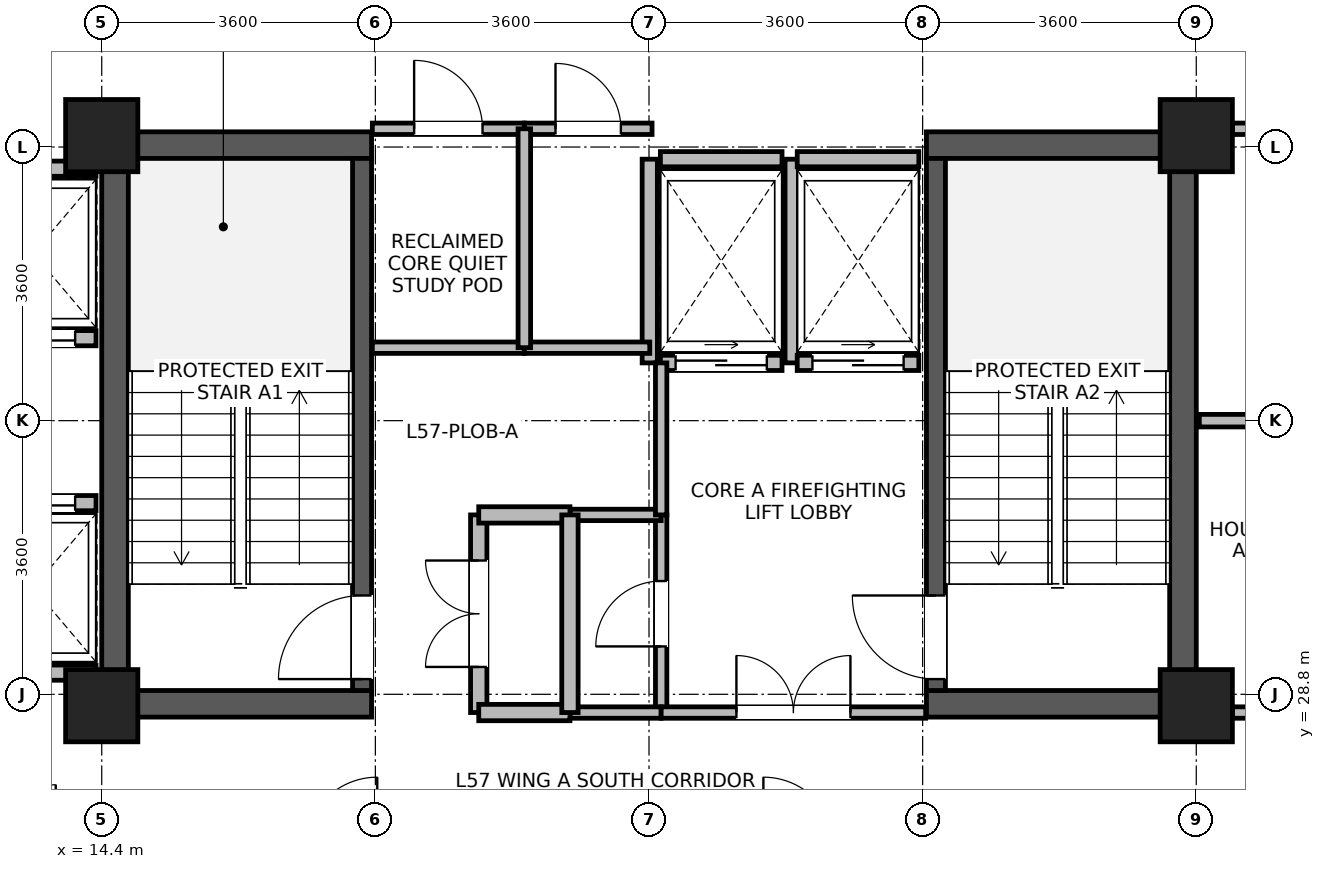
"""IFC4 building model, lengths in metres.
Left out: names, types, materials, properties, quantities, classifications, styles, units other than length and angle.
Written with IfcOpenShell. Run it as: python <this file> out.ifc"""

import sys

from ifc_helpers import new_model, si_unit, direction, frame, frame_2d, origin, origin_2d, place, context, subcontext, project, spatial, rectangle, extrude, source, transform, mapped, element, fill, save


model = new_model("IFC4")
c1 = context("Model", 3, precision=1e-05, world=origin(), true_north=direction((0.0, 1.0)))
c2 = subcontext(c1, "Body", "Model", "MODEL_VIEW")
j1 = project(units=[si_unit("LENGTHUNIT", "METRE"), si_unit("PLANEANGLEUNIT", "RADIAN")], contexts=[c1])
p1 = place(None, origin())
s1 = spatial("IfcSite", under=j1, at=p1, CompositionType="ELEMENT")
p2 = place(p1, origin())
s2 = spatial("IfcBuilding", under=s1, at=p2, CompositionType="ELEMENT")
p3 = place(p2, frame((0.0, 0.0, 224.0)))
s3 = spatial("IfcBuildingStorey", under=s2, at=p3, CompositionType="ELEMENT", Elevation=224.0)
for number, where, z_axis, x_axis in (
    (1, (14.575, 28.5, 0.0), (0.0, 0.0, 1.0), (0.0, 1.0, 0.0)),
    (2, (28.625, 28.5, 0.0), (0.0, 0.0, 1.0), (0.0, 1.0, 0.0)),
):
    element("IfcWall", number, at=place(p3, frame(where, z_axis=z_axis, x_axis=x_axis)), inside=s3, PredefinedType="SHEAR", context=c2, shape_type="SweptSolid", body=[
        extrude(rectangle(XDim=7.7, YDim=0.35, at=frame_2d((3.85, 0.0))), origin(), (0.0, 0.0, 1.0), 3.47),
    ])
for number, where, z_axis, x_axis in (
    (3, (14.75, 28.675, 0.0), (0.0, 0.0, 1.0), (1.0, 0.0, 0.0)),
    (4, (25.25, 28.675, 0.0), (0.0, 0.0, 1.0), (1.0, 0.0, 0.0)),
    (5, (14.75, 36.025, 0.0), (0.0, 0.0, 1.0), (1.0, 0.0, 0.0)),
    (6, (25.25, 36.025, 0.0), (0.0, 0.0, 1.0), (1.0, 0.0, 0.0)),
):
    element("IfcWall", number, at=place(p3, frame(where, z_axis=z_axis, x_axis=x_axis)), inside=s3, PredefinedType="SHEAR", context=c2, shape_type="SweptSolid", body=[
        extrude(rectangle(XDim=3.2, YDim=0.35, at=frame_2d((1.6, 0.0))), origin(), (0.0, 0.0, 1.0), 3.47),
    ])
p4 = place(p3, frame((17.825, 28.85, 0.0), z_axis=(0.0, 0.0, 1.0), x_axis=(0.0, 1.0, 0.0)))
e7 = element("IfcWall", 7, at=p4, inside=s3, PredefinedType="SHEAR", context=c2, shape_type="SweptSolid", body=[
    extrude(rectangle(XDim=7.0, YDim=0.25, at=frame_2d((3.5, 0.0))), origin(), (0.0, 0.0, 1.0), 3.47),
])
p5 = place(p4, frame((0.15, 0.0, 0.0)))
e8 = element("IfcOpeningElement", 8, at=p5, cuts=e7, PredefinedType="OPENING", context=c2, shape_type="SweptSolid", body=[
    extrude(rectangle(XDim=1.1, YDim=2.08, at=frame_2d((0.55, 1.04))), frame((0.0, 0.135, 0.0), z_axis=(0.0, -1.0, 0.0), x_axis=(1.0, 0.0, 0.0)), (0.0, 0.0, 1.0), 0.27),
])
p6 = place(p3, frame((25.375, 28.85, 0.0), z_axis=(0.0, 0.0, 1.0), x_axis=(0.0, 1.0, 0.0)))
e9 = element("IfcWall", 9, at=p6, inside=s3, PredefinedType="SHEAR", context=c2, shape_type="SweptSolid", body=[
    extrude(rectangle(XDim=7.0, YDim=0.25, at=frame_2d((3.5, 0.0))), origin(), (0.0, 0.0, 1.0), 3.47),
])
p7 = place(p6, frame((0.15, 0.0, 0.0)))
e10 = element("IfcOpeningElement", 10, at=p7, cuts=e9, PredefinedType="OPENING", context=c2, shape_type="SweptSolid", body=[
    extrude(rectangle(XDim=1.1, YDim=2.08, at=frame_2d((0.55, 1.04))), frame((0.0, 0.135, 0.0), z_axis=(0.0, -1.0, 0.0), x_axis=(1.0, 0.0, 0.0)), (0.0, 0.0, 1.0), 0.27),
])
m1 = source(origin(), c2, "Body", "SweptSolid", [
    extrude(rectangle(XDim=0.95, YDim=0.95, at=origin_2d()), origin(), (0.0, 0.0, 1.0), 3.7),
])
for number, where, z_axis, x_axis in (
    (11, (14.4, 28.65, 0.0), (0.0, 0.0, 1.0), (1.0, 0.0, 0.0)),
    (12, (14.4, 36.15, 0.0), (0.0, 0.0, 1.0), (1.0, 0.0, 0.0)),
    (13, (28.8, 28.65, 0.0), (0.0, 0.0, 1.0), (1.0, 0.0, 0.0)),
    (14, (28.8, 36.15, 0.0), (0.0, 0.0, 1.0), (1.0, 0.0, 0.0)),
):
    element("IfcColumn", number, at=place(p3, frame(where, z_axis=z_axis, x_axis=x_axis)), inside=s3, PredefinedType="COLUMN", context=c2, shape_type="MappedRepresentation", body=[
        mapped(m1, transform((0.0, 0.0, 0.0), x_axis=(1.0, 0.0, 0.0), y_axis=(0.0, 1.0, 0.0), z_axis=(0.0, 0.0, 1.0), scale=1.0)),
    ])
p8 = place(p3, frame((12.675, 33.485, 0.0), z_axis=(0.0, 0.0, 1.0), x_axis=(1.0, 0.0, 0.0)))
e15 = element("IfcWall", 15, at=p8, inside=s3, PredefinedType="PARTITIONING", context=c2, shape_type="SweptSolid", body=[
    extrude(rectangle(XDim=1.65, YDim=0.2, at=frame_2d((0.825, 0.0))), origin(), (0.0, 0.0, 1.0), 3.45),
])
p9 = place(p8, frame((0.275, 0.0, 0.0)))
e16 = element("IfcOpeningElement", 16, at=p9, cuts=e15, PredefinedType="OPENING", context=c2, shape_type="SweptSolid", body=[
    extrude(rectangle(XDim=1.1, YDim=2.12, at=frame_2d((0.55, 1.06))), frame((0.0, 0.11, 0.0), z_axis=(0.0, -1.0, 0.0), x_axis=(1.0, 0.0, 0.0)), (0.0, 0.0, 1.0), 0.22),
])
for number, where, z_axis, x_axis in (
    (17, (12.675, 35.715, 0.0), (0.0, 0.0, 1.0), (1.0, 0.0, 0.0)),
    (18, (12.675, 29.085, 0.0), (0.0, 0.0, 1.0), (1.0, 0.0, 0.0)),
):
    element("IfcWall", number, at=place(p3, frame(where, z_axis=z_axis, x_axis=x_axis)), inside=s3, PredefinedType="PARTITIONING", context=c2, shape_type="SweptSolid", body=[
        extrude(rectangle(XDim=1.65, YDim=0.2, at=frame_2d((0.825, 0.0))), origin(), (0.0, 0.0, 1.0), 3.45),
    ])
p10 = place(p3, frame((12.675, 31.315, 0.0), z_axis=(0.0, 0.0, 1.0), x_axis=(1.0, 0.0, 0.0)))
e19 = element("IfcWall", 19, at=p10, inside=s3, PredefinedType="PARTITIONING", context=c2, shape_type="SweptSolid", body=[
    extrude(rectangle(XDim=1.65, YDim=0.2, at=frame_2d((0.825, 0.0))), origin(), (0.0, 0.0, 1.0), 3.45),
])
p11 = place(p10, frame((0.275, 0.0, 0.0)))
e20 = element("IfcOpeningElement", 20, at=p11, cuts=e19, PredefinedType="OPENING", context=c2, shape_type="SweptSolid", body=[
    extrude(rectangle(XDim=1.1, YDim=2.12, at=frame_2d((0.55, 1.06))), frame((0.0, 0.11, 0.0), z_axis=(0.0, -1.0, 0.0), x_axis=(1.0, 0.0, 0.0)), (0.0, 0.0, 1.0), 0.22),
])
p12 = place(p3, frame((21.75, 33.16, 0.0), z_axis=(0.0, 0.0, 1.0), x_axis=(1.0, 0.0, 0.0)))
e21 = element("IfcWall", 21, at=p12, inside=s3, PredefinedType="PARTITIONING", context=c2, shape_type="SweptSolid", body=[
    extrude(rectangle(XDim=1.6, YDim=0.2, at=frame_2d((0.8, 0.0))), origin(), (0.0, 0.0, 1.0), 3.45),
])
p13 = place(p12, frame((0.2, 0.0, 0.0)))
e22 = element("IfcOpeningElement", 22, at=p13, cuts=e21, PredefinedType="OPENING", context=c2, shape_type="SweptSolid", body=[
    extrude(rectangle(XDim=1.2, YDim=2.12, at=frame_2d((0.6, 1.06))), frame((0.0, 0.11, 0.0), z_axis=(0.0, -1.0, 0.0), x_axis=(1.0, 0.0, 0.0)), (0.0, 0.0, 1.0), 0.22),
])
p14 = place(p3, frame((21.75, 35.84, 0.0), z_axis=(0.0, 0.0, 1.0), x_axis=(1.0, 0.0, 0.0)))
e23 = element("IfcWall", 23, at=p14, inside=s3, PredefinedType="PARTITIONING", context=c2, shape_type="SweptSolid", body=[
    extrude(rectangle(XDim=1.6, YDim=0.2, at=frame_2d((0.8, 0.0))), origin(), (0.0, 0.0, 1.0), 2.55),
])
for number, where, z_axis, x_axis in (
    (24, (21.61, 33.16, 0.0), (0.0, 0.0, 1.0), (0.0, 1.0, 0.0)),
    (25, (23.49, 33.16, 0.0), (0.0, 0.0, 1.0), (0.0, 1.0, 0.0)),
):
    element("IfcWall", number, at=place(p3, frame(where, z_axis=z_axis, x_axis=x_axis)), inside=s3, PredefinedType="PARTITIONING", context=c2, shape_type="SweptSolid", body=[
        extrude(rectangle(XDim=2.68, YDim=0.2, at=frame_2d((1.34, 0.0))), origin(), (0.0, 0.0, 1.0), 3.45),
    ])
p15 = place(p3, frame((23.55, 33.16, 0.0), z_axis=(0.0, 0.0, 1.0), x_axis=(1.0, 0.0, 0.0)))
e26 = element("IfcWall", 26, at=p15, inside=s3, PredefinedType="PARTITIONING", context=c2, shape_type="SweptSolid", body=[
    extrude(rectangle(XDim=1.6, YDim=0.2, at=frame_2d((0.8, 0.0))), origin(), (0.0, 0.0, 1.0), 3.45),
])
p16 = place(p15, frame((0.2, 0.0, 0.0)))
e27 = element("IfcOpeningElement", 27, at=p16, cuts=e26, PredefinedType="OPENING", context=c2, shape_type="SweptSolid", body=[
    extrude(rectangle(XDim=1.2, YDim=2.12, at=frame_2d((0.6, 1.06))), frame((0.0, 0.11, 0.0), z_axis=(0.0, -1.0, 0.0), x_axis=(1.0, 0.0, 0.0)), (0.0, 0.0, 1.0), 0.22),
])
p17 = place(p3, frame((23.55, 35.84, 0.0), z_axis=(0.0, 0.0, 1.0), x_axis=(1.0, 0.0, 0.0)))
e28 = element("IfcWall", 28, at=p17, inside=s3, PredefinedType="PARTITIONING", context=c2, shape_type="SweptSolid", body=[
    extrude(rectangle(XDim=1.6, YDim=0.2, at=frame_2d((0.8, 0.0))), origin(), (0.0, 0.0, 1.0), 2.55),
])
p18 = place(p3, frame((29.275, 36.24, 0.0), z_axis=(0.0, 0.0, 1.0), x_axis=(1.0, 0.0, 0.0)))
e29 = element("IfcWall", 29, at=p18, inside=s3, PredefinedType="PARTITIONING", context=c2, shape_type="SweptSolid", body=[
    extrude(rectangle(XDim=4.085, YDim=0.15, at=frame_2d((2.042, 0.0))), origin(), (0.0, 0.0, 1.0), 2.9),
])
p19 = place(p18, frame((1.393, 0.0, 0.0)))
e30 = element("IfcOpeningElement", 30, at=p19, cuts=e29, PredefinedType="OPENING", context=c2, shape_type="SweptSolid", body=[
    extrude(rectangle(XDim=1.3, YDim=2.12, at=frame_2d((0.65, 1.06))), frame((0.0, 0.085, 0.0), z_axis=(0.0, -1.0, 0.0), x_axis=(1.0, 0.0, 0.0)), (0.0, 0.0, 1.0), 0.17),
])
p20 = place(p3, frame((19.36, 28.56, 0.0), z_axis=(0.0, 0.0, 1.0), x_axis=(0.0, 1.0, 0.0)))
e31 = element("IfcWall", 31, at=p20, inside=s3, PredefinedType="PARTITIONING", context=c2, shape_type="SweptSolid", body=[
    extrude(rectangle(XDim=2.6, YDim=0.215, at=frame_2d((1.3, 0.0))), origin(), (0.0, 0.0, 1.0), 3.45),
])
p21 = place(p20, frame((0.6, 0.0, 0.0)))
e32 = element("IfcOpeningElement", 32, at=p21, cuts=e31, PredefinedType="OPENING", context=c2, shape_type="SweptSolid", body=[
    extrude(rectangle(XDim=1.4, YDim=2.15, at=frame_2d((0.7, 1.075))), frame((0.0, 0.118, 0.0), z_axis=(0.0, -1.0, 0.0), x_axis=(1.0, 0.0, 0.0)), (0.0, 0.0, 1.0), 0.235),
])
p22 = place(p3, frame((21.76, 28.56, 0.0), z_axis=(0.0, 0.0, 1.0), x_axis=(0.0, 1.0, 0.0)))
e33 = element("IfcWall", 33, at=p22, inside=s3, PredefinedType="PARTITIONING", context=c2, shape_type="SweptSolid", body=[
    extrude(rectangle(XDim=2.6, YDim=0.15, at=frame_2d((1.3, 0.0))), origin(), (0.0, 0.0, 1.0), 3.45),
])
p23 = place(p22, frame((0.87, 0.0, 0.0)))
e34 = element("IfcOpeningElement", 34, at=p23, cuts=e33, PredefinedType="OPENING", context=c2, shape_type="SweptSolid", body=[
    extrude(rectangle(XDim=0.86, YDim=2.02, at=frame_2d((0.43, 1.01))), frame((0.0, 0.085, 0.0), z_axis=(0.0, -1.0, 0.0), x_axis=(1.0, 0.0, 0.0)), (0.0, 0.0, 1.0), 0.17),
])
p24 = place(p3, frame((29.275, 28.56, 0.0), z_axis=(0.0, 0.0, 1.0), x_axis=(1.0, 0.0, 0.0)))
e35 = element("IfcWall", 35, at=p24, inside=s3, PredefinedType="PARTITIONING", context=c2, shape_type="SweptSolid", body=[
    extrude(rectangle(XDim=1.825, YDim=0.15, at=frame_2d((0.913, 0.0))), origin(), (0.0, 0.0, 1.0), 2.9),
])
p25 = place(p24, frame((0.482, 0.0, 0.0)))
e36 = element("IfcOpeningElement", 36, at=p25, cuts=e35, PredefinedType="OPENING", context=c2, shape_type="SweptSolid", body=[
    extrude(rectangle(XDim=0.86, YDim=2.02, at=frame_2d((0.43, 1.01))), frame((0.0, 0.085, 0.0), z_axis=(0.0, -1.0, 0.0), x_axis=(1.0, 0.0, 0.0)), (0.0, 0.0, 1.0), 0.17),
])
p26 = place(p3, frame((17.96, 33.36, 0.0), z_axis=(0.0, 0.0, 1.0), x_axis=(1.0, 0.0, 0.0)))
e37 = element("IfcWall", 37, at=p26, inside=s3, PredefinedType="PARTITIONING", context=c2, shape_type="SweptSolid", body=[
    extrude(rectangle(XDim=2.0, YDim=0.15, at=frame_2d((1.0, 0.0))), origin(), (0.0, 0.0, 1.0), 3.45),
])
p27 = place(p3, frame((17.96, 36.24, 0.0), z_axis=(0.0, 0.0, 1.0), x_axis=(1.0, 0.0, 0.0)))
e38 = element("IfcWall", 38, at=p27, inside=s3, PredefinedType="PARTITIONING", context=c2, shape_type="SweptSolid", body=[
    extrude(rectangle(XDim=2.0, YDim=0.15, at=frame_2d((1.0, 0.0))), origin(), (0.0, 0.0, 1.0), 2.55),
])
p28 = place(p27, frame((0.55, 0.0, 0.0)))
e39 = element("IfcOpeningElement", 39, at=p28, cuts=e38, PredefinedType="OPENING", context=c2, shape_type="SweptSolid", body=[
    extrude(rectangle(XDim=0.9, YDim=2.08, at=frame_2d((0.45, 1.04))), frame((0.0, 0.085, 0.0), z_axis=(0.0, -1.0, 0.0), x_axis=(1.0, 0.0, 0.0)), (0.0, 0.0, 1.0), 0.17),
])
p29 = place(p3, frame((19.96, 33.36, 0.0), z_axis=(0.0, 0.0, 1.0), x_axis=(1.0, 0.0, 0.0)))
e40 = element("IfcWall", 40, at=p29, inside=s3, PredefinedType="PARTITIONING", context=c2, shape_type="SweptSolid", body=[
    extrude(rectangle(XDim=1.65, YDim=0.15, at=frame_2d((0.825, 0.0))), origin(), (0.0, 0.0, 1.0), 3.45),
])
p30 = place(p3, frame((19.96, 36.24, 0.0), z_axis=(0.0, 0.0, 1.0), x_axis=(1.0, 0.0, 0.0)))
e41 = element("IfcWall", 41, at=p30, inside=s3, PredefinedType="PARTITIONING", context=c2, shape_type="SweptSolid", body=[
    extrude(rectangle(XDim=1.68, YDim=0.15, at=frame_2d((0.84, 0.0))), origin(), (0.0, 0.0, 1.0), 2.55),
])
p31 = place(p30, frame((0.41, 0.0, 0.0)))
e42 = element("IfcOpeningElement", 42, at=p31, cuts=e41, PredefinedType="OPENING", context=c2, shape_type="SweptSolid", body=[
    extrude(rectangle(XDim=0.86, YDim=2.02, at=frame_2d((0.43, 1.01))), frame((0.0, 0.085, 0.0), z_axis=(0.0, -1.0, 0.0), x_axis=(1.0, 0.0, 0.0)), (0.0, 0.0, 1.0), 0.17),
])
p32 = place(p3, frame((20.56, 28.56, 0.0), z_axis=(0.0, 0.0, 1.0), x_axis=(1.0, 0.0, 0.0)))
e43 = element("IfcWall", 43, at=p32, inside=s3, PredefinedType="PARTITIONING", context=c2, shape_type="SweptSolid", body=[
    extrude(rectangle(XDim=1.2, YDim=0.15, at=frame_2d((0.6, 0.0))), origin(), (0.0, 0.0, 1.0), 2.55),
])
p33 = place(p3, frame((20.56, 31.16, 0.0), z_axis=(0.0, 0.0, 1.0), x_axis=(1.0, 0.0, 0.0)))
e44 = element("IfcWall", 44, at=p33, inside=s3, PredefinedType="PARTITIONING", context=c2, shape_type="SweptSolid", body=[
    extrude(rectangle(XDim=1.2, YDim=0.15, at=frame_2d((0.6, 0.0))), origin(), (0.0, 0.0, 1.0), 3.45),
])
p34 = place(p3, frame((19.36, 28.56, 0.0), z_axis=(0.0, 0.0, 1.0), x_axis=(1.0, 0.0, 0.0)))
e45 = element("IfcWall", 45, at=p34, inside=s3, PredefinedType="PARTITIONING", context=c2, shape_type="SweptSolid", body=[
    extrude(rectangle(XDim=1.2, YDim=0.215, at=frame_2d((0.6, 0.0))), origin(), (0.0, 0.0, 1.0), 2.55),
])
p35 = place(p3, frame((19.36, 31.16, 0.0), z_axis=(0.0, 0.0, 1.0), x_axis=(1.0, 0.0, 0.0)))
e46 = element("IfcWall", 46, at=p35, inside=s3, PredefinedType="PARTITIONING", context=c2, shape_type="SweptSolid", body=[
    extrude(rectangle(XDim=1.2, YDim=0.215, at=frame_2d((0.6, 0.0))), origin(), (0.0, 0.0, 1.0), 3.45),
])
p36 = place(p3, frame((21.76, 28.56, 0.0), z_axis=(0.0, 0.0, 1.0), x_axis=(1.0, 0.0, 0.0)))
e47 = element("IfcWall", 47, at=p36, inside=s3, PredefinedType="PARTITIONING", context=c2, shape_type="SweptSolid", body=[
    extrude(rectangle(XDim=3.48, YDim=0.15, at=frame_2d((1.74, 0.0))), origin(), (0.0, 0.0, 1.0), 2.55),
])
p37 = place(p36, frame((0.99, 0.0, 0.0)))
e48 = element("IfcOpeningElement", 48, at=p37, cuts=e47, PredefinedType="OPENING", context=c2, shape_type="SweptSolid", body=[
    extrude(rectangle(XDim=1.5, YDim=2.1, at=frame_2d((0.75, 1.05))), frame((0.0, 0.085, 0.0), z_axis=(0.0, -1.0, 0.0), x_axis=(1.0, 0.0, 0.0)), (0.0, 0.0, 1.0), 0.17),
])
p38 = place(p3, frame((19.96, 33.36, 0.0), z_axis=(0.0, 0.0, 1.0), x_axis=(0.0, 1.0, 0.0)))
e49 = element("IfcWall", 49, at=p38, inside=s3, PredefinedType="PARTITIONING", context=c2, shape_type="SweptSolid", body=[
    extrude(rectangle(XDim=2.88, YDim=0.165, at=frame_2d((1.44, 0.0))), origin(), (0.0, 0.0, 1.0), 3.45),
])
p39 = place(p3, frame((20.56, 28.56, 0.0), z_axis=(0.0, 0.0, 1.0), x_axis=(0.0, 1.0, 0.0)))
e50 = element("IfcWall", 50, at=p39, inside=s3, PredefinedType="PARTITIONING", context=c2, shape_type="SweptSolid", body=[
    extrude(rectangle(XDim=2.6, YDim=0.215, at=frame_2d((1.3, 0.0))), origin(), (0.0, 0.0, 1.0), 3.45),
])
p40 = place(p3, frame((28.84, 32.4, 0.0), z_axis=(0.0, 0.0, 1.0), x_axis=(1.0, 0.0, 0.0)))
e51 = element("IfcWall", 51, at=p40, inside=s3, PredefinedType="PARTITIONING", context=c2, shape_type="SweptSolid", body=[
    extrude(rectangle(XDim=2.26, YDim=0.165, at=frame_2d((1.13, 0.0))), origin(), (0.0, 0.0, 1.0), 3.45),
])
p41 = place(p3, frame((21.76, 31.16, 0.0), z_axis=(0.0, 0.0, 1.0), x_axis=(0.0, 1.0, 0.0)))
e52 = element("IfcWall", 52, at=p41, inside=s3, PredefinedType="PARTITIONING", context=c2, shape_type="SweptSolid", body=[
    extrude(rectangle(XDim=2.0, YDim=0.15, at=frame_2d((1.0, 0.0))), origin(), (0.0, 0.0, 1.0), 3.45),
])
p42 = place(p5, origin())
e53 = element("IfcDoor", 53, at=p42, inside=s3, OperationType="SINGLE_SWING_LEFT", PredefinedType="DOOR", context=c2, shape_type="SweptSolid", body=[
    extrude(rectangle(XDim=1.1, YDim=2.08, at=frame_2d((0.55, 1.04))), frame((0.0, 0.025, 0.0), z_axis=(0.0, -1.0, 0.0), x_axis=(1.0, 0.0, 0.0)), (0.0, 0.0, 1.0), 0.05),
])
fill(e8, e53)
p43 = place(p7, origin())
e54 = element("IfcDoor", 54, at=p43, inside=s3, OperationType="SINGLE_SWING_RIGHT", PredefinedType="DOOR", context=c2, shape_type="SweptSolid", body=[
    extrude(rectangle(XDim=1.1, YDim=2.08, at=frame_2d((0.55, 1.04))), frame((0.0, 0.025, 0.0), z_axis=(0.0, -1.0, 0.0), x_axis=(1.0, 0.0, 0.0)), (0.0, 0.0, 1.0), 0.05),
])
fill(e10, e54)
p44 = place(p9, origin())
e55 = element("IfcDoor", 55, at=p44, inside=s3, OperationType="SLIDING_TO_LEFT", PredefinedType="DOOR", context=c2, shape_type="SweptSolid", body=[
    extrude(rectangle(XDim=1.1, YDim=2.12, at=frame_2d((0.55, 1.06))), frame((0.0, 0.025, 0.0), z_axis=(0.0, -1.0, 0.0), x_axis=(1.0, 0.0, 0.0)), (0.0, 0.0, 1.0), 0.05),
])
fill(e16, e55)
p45 = place(p11, origin())
e56 = element("IfcDoor", 56, at=p45, inside=s3, OperationType="SLIDING_TO_LEFT", PredefinedType="DOOR", context=c2, shape_type="SweptSolid", body=[
    extrude(rectangle(XDim=1.1, YDim=2.12, at=frame_2d((0.55, 1.06))), frame((0.0, 0.025, 0.0), z_axis=(0.0, -1.0, 0.0), x_axis=(1.0, 0.0, 0.0)), (0.0, 0.0, 1.0), 0.05),
])
fill(e20, e56)
p46 = place(p13, origin())
e57 = element("IfcDoor", 57, at=p46, inside=s3, OperationType="SLIDING_TO_RIGHT", PredefinedType="DOOR", context=c2, shape_type="SweptSolid", body=[
    extrude(rectangle(XDim=1.2, YDim=2.12, at=frame_2d((0.6, 1.06))), frame((0.0, 0.025, 0.0), z_axis=(0.0, -1.0, 0.0), x_axis=(1.0, 0.0, 0.0)), (0.0, 0.0, 1.0), 0.05),
])
fill(e22, e57)
p47 = place(p16, origin())
e58 = element("IfcDoor", 58, at=p47, inside=s3, OperationType="SLIDING_TO_RIGHT", PredefinedType="DOOR", context=c2, shape_type="SweptSolid", body=[
    extrude(rectangle(XDim=1.2, YDim=2.12, at=frame_2d((0.6, 1.06))), frame((0.0, 0.025, 0.0), z_axis=(0.0, -1.0, 0.0), x_axis=(1.0, 0.0, 0.0)), (0.0, 0.0, 1.0), 0.05),
])
fill(e27, e58)
p48 = place(p21, origin())
e59 = element("IfcDoor", 59, at=p48, inside=s3, OperationType="DOUBLE_DOOR_SINGLE_SWING", PredefinedType="DOOR", context=c2, shape_type="SweptSolid", body=[
    extrude(rectangle(XDim=1.4, YDim=2.15, at=frame_2d((0.7, 1.075))), frame((0.0, 0.025, 0.0), z_axis=(0.0, -1.0, 0.0), x_axis=(1.0, 0.0, 0.0)), (0.0, 0.0, 1.0), 0.05),
])
fill(e32, e59)
p49 = place(p23, origin())
e60 = element("IfcDoor", 60, at=p49, inside=s3, OperationType="SINGLE_SWING_LEFT", PredefinedType="DOOR", context=c2, shape_type="SweptSolid", body=[
    extrude(rectangle(XDim=0.86, YDim=2.02, at=frame_2d((0.43, 1.01))), frame((0.0, 0.025, 0.0), z_axis=(0.0, -1.0, 0.0), x_axis=(1.0, 0.0, 0.0)), (0.0, 0.0, 1.0), 0.05),
])
fill(e34, e60)
p50 = place(p28, origin())
e61 = element("IfcDoor", 61, at=p50, inside=s3, OperationType="SINGLE_SWING_LEFT", PredefinedType="DOOR", context=c2, shape_type="SweptSolid", body=[
    extrude(rectangle(XDim=0.9, YDim=2.08, at=frame_2d((0.45, 1.04))), frame((0.0, 0.025, 0.0), z_axis=(0.0, -1.0, 0.0), x_axis=(1.0, 0.0, 0.0)), (0.0, 0.0, 1.0), 0.05),
])
fill(e39, e61)
p51 = place(p31, origin())
e62 = element("IfcDoor", 62, at=p51, inside=s3, OperationType="SINGLE_SWING_LEFT", PredefinedType="DOOR", context=c2, shape_type="SweptSolid", body=[
    extrude(rectangle(XDim=0.86, YDim=2.02, at=frame_2d((0.43, 1.01))), frame((0.0, 0.025, 0.0), z_axis=(0.0, -1.0, 0.0), x_axis=(1.0, 0.0, 0.0)), (0.0, 0.0, 1.0), 0.05),
])
fill(e42, e62)
p52 = place(p37, origin())
e63 = element("IfcDoor", 63, at=p52, inside=s3, OperationType="DOUBLE_DOOR_SINGLE_SWING", PredefinedType="DOOR", context=c2, shape_type="SweptSolid", body=[
    extrude(rectangle(XDim=1.5, YDim=2.1, at=frame_2d((0.75, 1.05))), frame((0.0, 0.025, 0.0), z_axis=(0.0, -1.0, 0.0), x_axis=(1.0, 0.0, 0.0)), (0.0, 0.0, 1.0), 0.05),
])
fill(e48, e63)
save(model, sys.argv[1])
